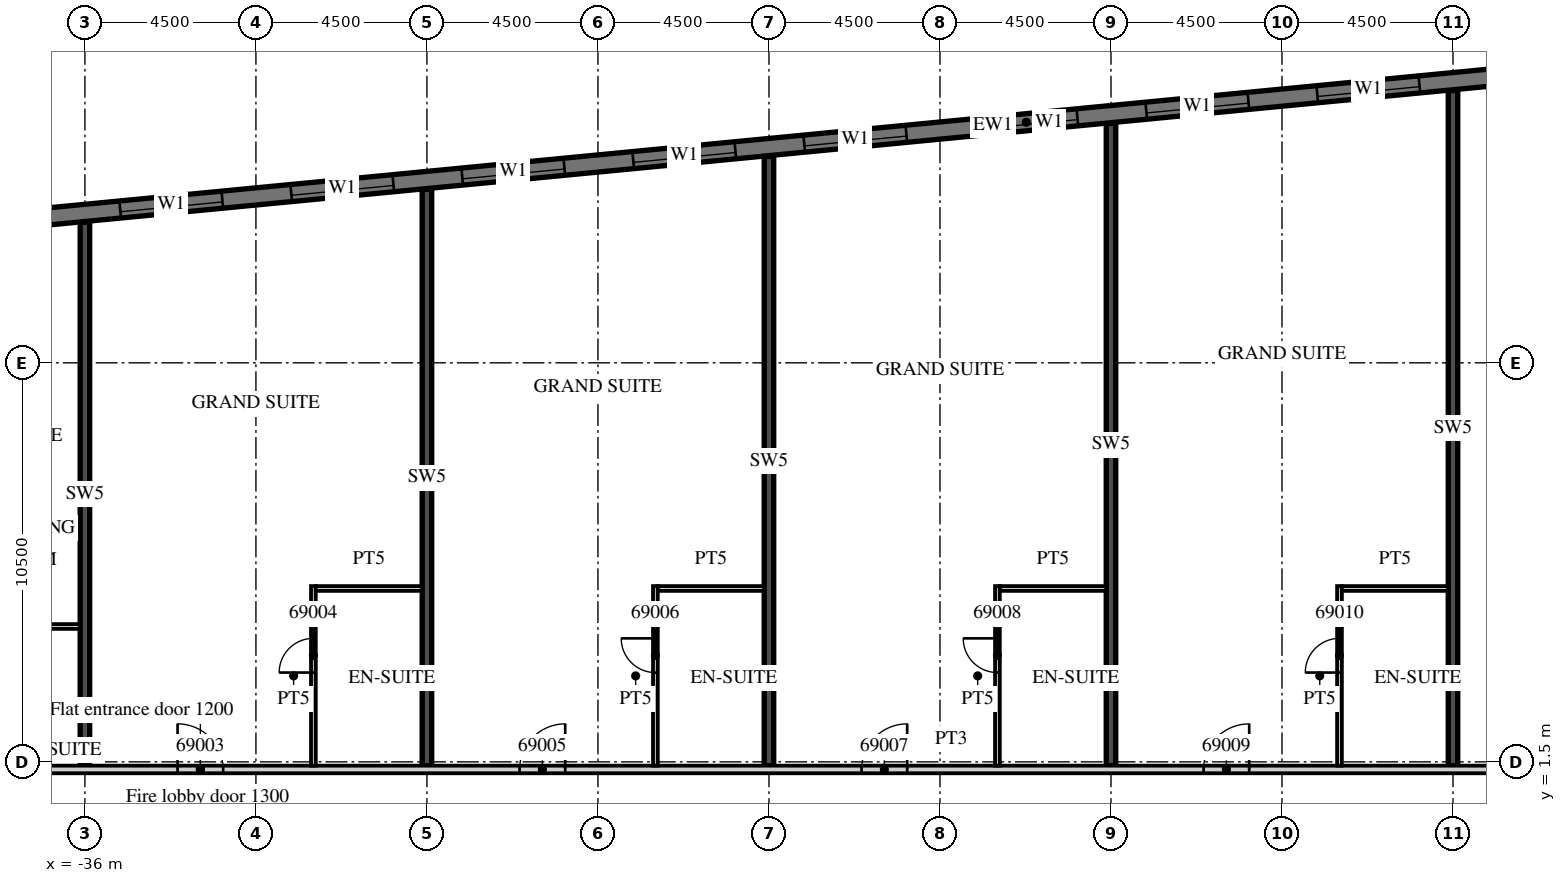
"""IFC4 building model, lengths in metres.
Left out: names, types, materials, properties, quantities, classifications, styles, units other than length and angle.
Written with IfcOpenShell. Run it as: python <this file> out.ifc"""

import sys

from ifc_helpers import new_model, si_unit, direction, frame, frame_2d, origin, place, context, subcontext, project, spatial, rectangle, extrude, element, fill, save


model = new_model("IFC4")
c1 = context("Model", 3, precision=1e-05, world=origin(), true_north=direction((0.0, 1.0)))
c2 = subcontext(c1, "Body", "Model", "MODEL_VIEW")
j1 = project(units=[si_unit("LENGTHUNIT", "METRE"), si_unit("PLANEANGLEUNIT", "RADIAN")], contexts=[c1])
p1 = place(None, origin())
s1 = spatial("IfcSite", under=j1, at=p1, CompositionType="ELEMENT")
p2 = place(p1, origin())
s2 = spatial("IfcBuilding", under=s1, at=p2, CompositionType="ELEMENT")
p3 = place(p2, frame((0.0, 0.0, 278.4)))
s3 = spatial("IfcBuildingStorey", under=s2, at=p3, CompositionType="ELEMENT", Elevation=278.4)
p4 = place(p3, frame((-36.0, 1.4, 0.0), z_axis=(0.0, 0.0, 1.0), x_axis=(0.0, 1.0, 0.0)))
e1 = element("IfcWall", 1, at=p4, inside=s3, PredefinedType="SHEAR", context=c2, shape_type="SweptSolid", body=[
    extrude(rectangle(XDim=14.296, YDim=0.25, at=frame_2d((7.148, 0.0))), origin(), (0.0, 0.0, 1.0), 3.3),
])
p5 = place(p3, frame((-27.0, 1.4, 0.0), z_axis=(0.0, 0.0, 1.0), x_axis=(0.0, 1.0, 0.0)))
e2 = element("IfcWall", 2, at=p5, inside=s3, PredefinedType="SHEAR", context=c2, shape_type="SweptSolid", body=[
    extrude(rectangle(XDim=15.163, YDim=0.25, at=frame_2d((7.582, 0.0))), origin(), (0.0, 0.0, 1.0), 3.3),
])
p6 = place(p3, frame((-18.0, 1.4, 0.0), z_axis=(0.0, 0.0, 1.0), x_axis=(0.0, 1.0, 0.0)))
e3 = element("IfcWall", 3, at=p6, inside=s3, PredefinedType="SHEAR", context=c2, shape_type="SweptSolid", body=[
    extrude(rectangle(XDim=16.03, YDim=0.25, at=frame_2d((8.015, 0.0))), origin(), (0.0, 0.0, 1.0), 3.3),
])
p7 = place(p3, frame((-9.0, 1.4, 0.0), z_axis=(0.0, 0.0, 1.0), x_axis=(0.0, 1.0, 0.0)))
e4 = element("IfcWall", 4, at=p7, inside=s3, PredefinedType="SHEAR", context=c2, shape_type="SweptSolid", body=[
    extrude(rectangle(XDim=16.896, YDim=0.25, at=frame_2d((8.448, 0.0))), origin(), (0.0, 0.0, 1.0), 3.3),
])
p8 = place(p3, frame((0.0, 1.4, 0.0), z_axis=(0.0, 0.0, 1.0), x_axis=(0.0, 1.0, 0.0)))
e5 = element("IfcWall", 5, at=p8, inside=s3, PredefinedType="SHEAR", context=c2, shape_type="SweptSolid", body=[
    extrude(rectangle(XDim=17.763, YDim=0.25, at=frame_2d((8.881, 0.0))), origin(), (0.0, 0.0, 1.0), 3.3),
])
p9 = place(p3, frame((13.521, 20.713, 0.0), z_axis=(0.0, 0.0, 1.0), x_axis=(-0.995396277313, -0.095844932638, 0.0)))
e6 = element("IfcWall", 6, at=p9, inside=s3, PredefinedType="SOLIDWALL", context=c2, shape_type="SweptSolid", body=[
    extrude(rectangle(XDim=51.495, YDim=0.45, at=frame_2d((25.748, 0.0))), origin(), (0.0, 0.0, 1.0), 3.02),
])
p10 = place(p9, frame((0.91, 0.0, 0.45)))
e7 = element("IfcOpeningElement", 7, at=p10, cuts=e6, PredefinedType="OPENING", context=c2, shape_type="SweptSolid", body=[
    extrude(rectangle(XDim=2.7, YDim=2.25, at=frame_2d((1.35, 1.125))), frame((0.0, 0.235, 0.0), z_axis=(0.0, -1.0, 0.0), x_axis=(1.0, 0.0, 0.0)), (0.0, 0.0, 1.0), 0.47),
])
p11 = place(p9, frame((5.431, 0.0, 0.45)))
e8 = element("IfcOpeningElement", 8, at=p11, cuts=e6, PredefinedType="OPENING", context=c2, shape_type="SweptSolid", body=[
    extrude(rectangle(XDim=2.7, YDim=2.25, at=frame_2d((1.35, 1.125))), frame((0.0, 0.235, 0.0), z_axis=(0.0, -1.0, 0.0), x_axis=(1.0, 0.0, 0.0)), (0.0, 0.0, 1.0), 0.47),
])
p12 = place(p9, frame((9.952, 0.0, 0.45)))
e9 = element("IfcOpeningElement", 9, at=p12, cuts=e6, PredefinedType="OPENING", context=c2, shape_type="SweptSolid", body=[
    extrude(rectangle(XDim=2.7, YDim=2.25, at=frame_2d((1.35, 1.125))), frame((0.0, 0.235, 0.0), z_axis=(0.0, -1.0, 0.0), x_axis=(1.0, 0.0, 0.0)), (0.0, 0.0, 1.0), 0.47),
])
p13 = place(p9, frame((14.473, 0.0, 0.45)))
e10 = element("IfcOpeningElement", 10, at=p13, cuts=e6, PredefinedType="OPENING", context=c2, shape_type="SweptSolid", body=[
    extrude(rectangle(XDim=2.7, YDim=2.25, at=frame_2d((1.35, 1.125))), frame((0.0, 0.235, 0.0), z_axis=(0.0, -1.0, 0.0), x_axis=(1.0, 0.0, 0.0)), (0.0, 0.0, 1.0), 0.47),
])
p14 = place(p9, frame((18.994, 0.0, 0.45)))
e11 = element("IfcOpeningElement", 11, at=p14, cuts=e6, PredefinedType="OPENING", context=c2, shape_type="SweptSolid", body=[
    extrude(rectangle(XDim=2.7, YDim=2.25, at=frame_2d((1.35, 1.125))), frame((0.0, 0.235, 0.0), z_axis=(0.0, -1.0, 0.0), x_axis=(1.0, 0.0, 0.0)), (0.0, 0.0, 1.0), 0.47),
])
p15 = place(p9, frame((23.514, 0.0, 0.45)))
e12 = element("IfcOpeningElement", 12, at=p15, cuts=e6, PredefinedType="OPENING", context=c2, shape_type="SweptSolid", body=[
    extrude(rectangle(XDim=2.7, YDim=2.25, at=frame_2d((1.35, 1.125))), frame((0.0, 0.235, 0.0), z_axis=(0.0, -1.0, 0.0), x_axis=(1.0, 0.0, 0.0)), (0.0, 0.0, 1.0), 0.47),
])
p16 = place(p9, frame((28.035, 0.0, 0.45)))
e13 = element("IfcOpeningElement", 13, at=p16, cuts=e6, PredefinedType="OPENING", context=c2, shape_type="SweptSolid", body=[
    extrude(rectangle(XDim=2.7, YDim=2.25, at=frame_2d((1.35, 1.125))), frame((0.0, 0.235, 0.0), z_axis=(0.0, -1.0, 0.0), x_axis=(1.0, 0.0, 0.0)), (0.0, 0.0, 1.0), 0.47),
])
p17 = place(p9, frame((32.556, 0.0, 0.45)))
e14 = element("IfcOpeningElement", 14, at=p17, cuts=e6, PredefinedType="OPENING", context=c2, shape_type="SweptSolid", body=[
    extrude(rectangle(XDim=2.7, YDim=2.25, at=frame_2d((1.35, 1.125))), frame((0.0, 0.235, 0.0), z_axis=(0.0, -1.0, 0.0), x_axis=(1.0, 0.0, 0.0)), (0.0, 0.0, 1.0), 0.47),
])
p18 = place(p9, frame((37.077, 0.0, 0.45)))
e15 = element("IfcOpeningElement", 15, at=p18, cuts=e6, PredefinedType="OPENING", context=c2, shape_type="SweptSolid", body=[
    extrude(rectangle(XDim=2.7, YDim=2.25, at=frame_2d((1.35, 1.125))), frame((0.0, 0.235, 0.0), z_axis=(0.0, -1.0, 0.0), x_axis=(1.0, 0.0, 0.0)), (0.0, 0.0, 1.0), 0.47),
])
p19 = place(p9, frame((41.598, 0.0, 0.45)))
e16 = element("IfcOpeningElement", 16, at=p19, cuts=e6, PredefinedType="OPENING", context=c2, shape_type="SweptSolid", body=[
    extrude(rectangle(XDim=2.7, YDim=2.25, at=frame_2d((1.35, 1.125))), frame((0.0, 0.235, 0.0), z_axis=(0.0, -1.0, 0.0), x_axis=(1.0, 0.0, 0.0)), (0.0, 0.0, 1.0), 0.47),
])
p20 = place(p9, frame((46.118, 0.0, 0.45)))
e17 = element("IfcOpeningElement", 17, at=p20, cuts=e6, PredefinedType="OPENING", context=c2, shape_type="SweptSolid", body=[
    extrude(rectangle(XDim=2.7, YDim=2.25, at=frame_2d((1.35, 1.125))), frame((0.0, 0.235, 0.0), z_axis=(0.0, -1.0, 0.0), x_axis=(1.0, 0.0, 0.0)), (0.0, 0.0, 1.0), 0.47),
])
p21 = place(p3, frame((-39.909, 1.3, 0.0), z_axis=(0.0, 0.0, 1.0), x_axis=(1.0, 0.0, 0.0)))
e18 = element("IfcWall", 18, at=p21, inside=s3, PredefinedType="PARTITIONING", context=c2, shape_type="SweptSolid", body=[
    extrude(rectangle(XDim=53.409, YDim=0.2, at=frame_2d((26.705, 0.0))), origin(), (0.0, 0.0, 1.0), 3.02),
])
p22 = place(p21, frame((0.15, 0.0, 0.0)))
e19 = element("IfcOpeningElement", 19, at=p22, cuts=e18, PredefinedType="OPENING", context=c2, shape_type="SweptSolid", body=[
    extrude(rectangle(XDim=0.9, YDim=2.1, at=frame_2d((0.45, 1.05))), frame((0.0, 0.11, 0.0), z_axis=(0.0, -1.0, 0.0), x_axis=(1.0, 0.0, 0.0)), (0.0, 0.0, 1.0), 0.22),
])
p23 = place(p21, frame((6.347, 0.0, 0.0)))
e20 = element("IfcOpeningElement", 20, at=p23, cuts=e18, PredefinedType="OPENING", context=c2, shape_type="SweptSolid", body=[
    extrude(rectangle(XDim=1.2, YDim=2.1, at=frame_2d((0.6, 1.05))), frame((0.0, 0.11, 0.0), z_axis=(0.0, -1.0, 0.0), x_axis=(1.0, 0.0, 0.0)), (0.0, 0.0, 1.0), 0.22),
])
p24 = place(p21, frame((15.347, 0.0, 0.0)))
e21 = element("IfcOpeningElement", 21, at=p24, cuts=e18, PredefinedType="OPENING", context=c2, shape_type="SweptSolid", body=[
    extrude(rectangle(XDim=1.2, YDim=2.1, at=frame_2d((0.6, 1.05))), frame((0.0, 0.11, 0.0), z_axis=(0.0, -1.0, 0.0), x_axis=(1.0, 0.0, 0.0)), (0.0, 0.0, 1.0), 0.22),
])
p25 = place(p21, frame((24.346, 0.0, 0.0)))
e22 = element("IfcOpeningElement", 22, at=p25, cuts=e18, PredefinedType="OPENING", context=c2, shape_type="SweptSolid", body=[
    extrude(rectangle(XDim=1.2, YDim=2.1, at=frame_2d((0.6, 1.05))), frame((0.0, 0.11, 0.0), z_axis=(0.0, -1.0, 0.0), x_axis=(1.0, 0.0, 0.0)), (0.0, 0.0, 1.0), 0.22),
])
p26 = place(p21, frame((33.346, 0.0, 0.0)))
e23 = element("IfcOpeningElement", 23, at=p26, cuts=e18, PredefinedType="OPENING", context=c2, shape_type="SweptSolid", body=[
    extrude(rectangle(XDim=1.2, YDim=2.1, at=frame_2d((0.6, 1.05))), frame((0.0, 0.11, 0.0), z_axis=(0.0, -1.0, 0.0), x_axis=(1.0, 0.0, 0.0)), (0.0, 0.0, 1.0), 0.22),
])
p27 = place(p21, frame((42.346, 0.0, 0.0)))
e24 = element("IfcOpeningElement", 24, at=p27, cuts=e18, PredefinedType="OPENING", context=c2, shape_type="SweptSolid", body=[
    extrude(rectangle(XDim=1.2, YDim=2.1, at=frame_2d((0.6, 1.05))), frame((0.0, 0.11, 0.0), z_axis=(0.0, -1.0, 0.0), x_axis=(1.0, 0.0, 0.0)), (0.0, 0.0, 1.0), 0.22),
])
p28 = place(p21, frame((51.834, 0.0, 0.0)))
e25 = element("IfcOpeningElement", 25, at=p28, cuts=e18, PredefinedType="OPENING", context=c2, shape_type="SweptSolid", body=[
    extrude(rectangle(XDim=1.0, YDim=2.1, at=frame_2d((0.5, 1.05))), frame((0.0, 0.11, 0.0), z_axis=(0.0, -1.0, 0.0), x_axis=(1.0, 0.0, 0.0)), (0.0, 0.0, 1.0), 0.22),
])
p29 = place(p3, frame((-38.878, 5.062, 0.0), z_axis=(0.0, 0.0, 1.0), x_axis=(1.0, 0.0, 0.0)))
e26 = element("IfcWall", 26, at=p29, inside=s3, PredefinedType="PARTITIONING", context=c2, shape_type="SweptSolid", body=[
    extrude(rectangle(XDim=2.753, YDim=0.125, at=frame_2d((1.376, 0.0))), origin(), (0.0, 0.0, 1.0), 3.02),
])
p30 = place(p3, frame((-29.988, 1.4, 0.0), z_axis=(0.0, 0.0, 1.0), x_axis=(0.0, 1.0, 0.0)))
e27 = element("IfcWall", 27, at=p30, inside=s3, PredefinedType="PARTITIONING", context=c2, shape_type="SweptSolid", body=[
    extrude(rectangle(XDim=4.725, YDim=0.125, at=frame_2d((2.363, 0.0))), origin(), (0.0, 0.0, 1.0), 3.02),
])
p31 = place(p30, frame((2.45, 0.0, 0.0)))
e28 = element("IfcOpeningElement", 28, at=p31, cuts=e27, PredefinedType="OPENING", context=c2, shape_type="SweptSolid", body=[
    extrude(rectangle(XDim=0.9, YDim=2.1, at=frame_2d((0.45, 1.05))), frame((0.0, 0.073, 0.0), z_axis=(0.0, -1.0, 0.0), x_axis=(1.0, 0.0, 0.0)), (0.0, 0.0, 1.0), 0.145),
])
p32 = place(p3, frame((-29.925, 6.062, 0.0), z_axis=(0.0, 0.0, 1.0), x_axis=(1.0, 0.0, 0.0)))
e29 = element("IfcWall", 29, at=p32, inside=s3, PredefinedType="PARTITIONING", context=c2, shape_type="SweptSolid", body=[
    extrude(rectangle(XDim=2.8, YDim=0.125, at=frame_2d((1.4, 0.0))), origin(), (0.0, 0.0, 1.0), 3.02),
])
p33 = place(p3, frame((-20.988, 1.4, 0.0), z_axis=(0.0, 0.0, 1.0), x_axis=(0.0, 1.0, 0.0)))
e30 = element("IfcWall", 30, at=p33, inside=s3, PredefinedType="PARTITIONING", context=c2, shape_type="SweptSolid", body=[
    extrude(rectangle(XDim=4.725, YDim=0.125, at=frame_2d((2.363, 0.0))), origin(), (0.0, 0.0, 1.0), 3.02),
])
p34 = place(p33, frame((2.45, 0.0, 0.0)))
e31 = element("IfcOpeningElement", 31, at=p34, cuts=e30, PredefinedType="OPENING", context=c2, shape_type="SweptSolid", body=[
    extrude(rectangle(XDim=0.9, YDim=2.1, at=frame_2d((0.45, 1.05))), frame((0.0, 0.073, 0.0), z_axis=(0.0, -1.0, 0.0), x_axis=(1.0, 0.0, 0.0)), (0.0, 0.0, 1.0), 0.145),
])
p35 = place(p3, frame((-20.925, 6.062, 0.0), z_axis=(0.0, 0.0, 1.0), x_axis=(1.0, 0.0, 0.0)))
e32 = element("IfcWall", 32, at=p35, inside=s3, PredefinedType="PARTITIONING", context=c2, shape_type="SweptSolid", body=[
    extrude(rectangle(XDim=2.8, YDim=0.125, at=frame_2d((1.4, 0.0))), origin(), (0.0, 0.0, 1.0), 3.02),
])
p36 = place(p3, frame((-11.988, 1.4, 0.0), z_axis=(0.0, 0.0, 1.0), x_axis=(0.0, 1.0, 0.0)))
e33 = element("IfcWall", 33, at=p36, inside=s3, PredefinedType="PARTITIONING", context=c2, shape_type="SweptSolid", body=[
    extrude(rectangle(XDim=4.725, YDim=0.125, at=frame_2d((2.363, 0.0))), origin(), (0.0, 0.0, 1.0), 3.02),
])
p37 = place(p36, frame((2.45, 0.0, 0.0)))
e34 = element("IfcOpeningElement", 34, at=p37, cuts=e33, PredefinedType="OPENING", context=c2, shape_type="SweptSolid", body=[
    extrude(rectangle(XDim=0.9, YDim=2.1, at=frame_2d((0.45, 1.05))), frame((0.0, 0.073, 0.0), z_axis=(0.0, -1.0, 0.0), x_axis=(1.0, 0.0, 0.0)), (0.0, 0.0, 1.0), 0.145),
])
p38 = place(p3, frame((-11.925, 6.062, 0.0), z_axis=(0.0, 0.0, 1.0), x_axis=(1.0, 0.0, 0.0)))
e35 = element("IfcWall", 35, at=p38, inside=s3, PredefinedType="PARTITIONING", context=c2, shape_type="SweptSolid", body=[
    extrude(rectangle(XDim=2.8, YDim=0.125, at=frame_2d((1.4, 0.0))), origin(), (0.0, 0.0, 1.0), 3.02),
])
p39 = place(p3, frame((-2.987, 1.4, 0.0), z_axis=(0.0, 0.0, 1.0), x_axis=(0.0, 1.0, 0.0)))
e36 = element("IfcWall", 36, at=p39, inside=s3, PredefinedType="PARTITIONING", context=c2, shape_type="SweptSolid", body=[
    extrude(rectangle(XDim=4.725, YDim=0.125, at=frame_2d((2.363, 0.0))), origin(), (0.0, 0.0, 1.0), 3.02),
])
p40 = place(p39, frame((2.45, 0.0, 0.0)))
e37 = element("IfcOpeningElement", 37, at=p40, cuts=e36, PredefinedType="OPENING", context=c2, shape_type="SweptSolid", body=[
    extrude(rectangle(XDim=0.9, YDim=2.1, at=frame_2d((0.45, 1.05))), frame((0.0, 0.073, 0.0), z_axis=(0.0, -1.0, 0.0), x_axis=(1.0, 0.0, 0.0)), (0.0, 0.0, 1.0), 0.145),
])
p41 = place(p3, frame((-2.925, 6.062, 0.0), z_axis=(0.0, 0.0, 1.0), x_axis=(1.0, 0.0, 0.0)))
e38 = element("IfcWall", 38, at=p41, inside=s3, PredefinedType="PARTITIONING", context=c2, shape_type="SweptSolid", body=[
    extrude(rectangle(XDim=2.8, YDim=0.125, at=frame_2d((1.4, 0.0))), origin(), (0.0, 0.0, 1.0), 3.02),
])
p42 = place(p13, origin())
e39 = element("IfcWindow", 39, at=p42, inside=s3, PartitioningType="SINGLE_PANEL", PredefinedType="WINDOW", context=c2, shape_type="SweptSolid", body=[
    extrude(rectangle(XDim=2.7, YDim=2.25, at=frame_2d((1.35, 1.125))), frame((0.0, 0.09, 0.0), z_axis=(0.0, -1.0, 0.0), x_axis=(1.0, 0.0, 0.0)), (0.0, 0.0, 1.0), 0.06),
])
fill(e10, e39)
p43 = place(p14, origin())
e40 = element("IfcWindow", 40, at=p43, inside=s3, PartitioningType="SINGLE_PANEL", PredefinedType="WINDOW", context=c2, shape_type="SweptSolid", body=[
    extrude(rectangle(XDim=2.7, YDim=2.25, at=frame_2d((1.35, 1.125))), frame((0.0, 0.09, 0.0), z_axis=(0.0, -1.0, 0.0), x_axis=(1.0, 0.0, 0.0)), (0.0, 0.0, 1.0), 0.06),
])
fill(e11, e40)
p44 = place(p15, origin())
e41 = element("IfcWindow", 41, at=p44, inside=s3, PartitioningType="SINGLE_PANEL", PredefinedType="WINDOW", context=c2, shape_type="SweptSolid", body=[
    extrude(rectangle(XDim=2.7, YDim=2.25, at=frame_2d((1.35, 1.125))), frame((0.0, 0.09, 0.0), z_axis=(0.0, -1.0, 0.0), x_axis=(1.0, 0.0, 0.0)), (0.0, 0.0, 1.0), 0.06),
])
fill(e12, e41)
p45 = place(p16, origin())
e42 = element("IfcWindow", 42, at=p45, inside=s3, PartitioningType="SINGLE_PANEL", PredefinedType="WINDOW", context=c2, shape_type="SweptSolid", body=[
    extrude(rectangle(XDim=2.7, YDim=2.25, at=frame_2d((1.35, 1.125))), frame((0.0, 0.09, 0.0), z_axis=(0.0, -1.0, 0.0), x_axis=(1.0, 0.0, 0.0)), (0.0, 0.0, 1.0), 0.06),
])
fill(e13, e42)
p46 = place(p17, origin())
e43 = element("IfcWindow", 43, at=p46, inside=s3, PartitioningType="SINGLE_PANEL", PredefinedType="WINDOW", context=c2, shape_type="SweptSolid", body=[
    extrude(rectangle(XDim=2.7, YDim=2.25, at=frame_2d((1.35, 1.125))), frame((0.0, 0.09, 0.0), z_axis=(0.0, -1.0, 0.0), x_axis=(1.0, 0.0, 0.0)), (0.0, 0.0, 1.0), 0.06),
])
fill(e14, e43)
p47 = place(p18, origin())
e44 = element("IfcWindow", 44, at=p47, inside=s3, PartitioningType="SINGLE_PANEL", PredefinedType="WINDOW", context=c2, shape_type="SweptSolid", body=[
    extrude(rectangle(XDim=2.7, YDim=2.25, at=frame_2d((1.35, 1.125))), frame((0.0, 0.09, 0.0), z_axis=(0.0, -1.0, 0.0), x_axis=(1.0, 0.0, 0.0)), (0.0, 0.0, 1.0), 0.06),
])
fill(e15, e44)
p48 = place(p19, origin())
e45 = element("IfcWindow", 45, at=p48, inside=s3, PartitioningType="SINGLE_PANEL", PredefinedType="WINDOW", context=c2, shape_type="SweptSolid", body=[
    extrude(rectangle(XDim=2.7, YDim=2.25, at=frame_2d((1.35, 1.125))), frame((0.0, 0.09, 0.0), z_axis=(0.0, -1.0, 0.0), x_axis=(1.0, 0.0, 0.0)), (0.0, 0.0, 1.0), 0.06),
])
fill(e16, e45)
p49 = place(p20, origin())
e46 = element("IfcWindow", 46, at=p49, inside=s3, PartitioningType="SINGLE_PANEL", PredefinedType="WINDOW", context=c2, shape_type="SweptSolid", body=[
    extrude(rectangle(XDim=2.7, YDim=2.25, at=frame_2d((1.35, 1.125))), frame((0.0, 0.09, 0.0), z_axis=(0.0, -1.0, 0.0), x_axis=(1.0, 0.0, 0.0)), (0.0, 0.0, 1.0), 0.06),
])
fill(e17, e46)
p50 = place(p23, origin())
e47 = element("IfcDoor", 47, at=p50, inside=s3, OperationType="SINGLE_SWING_LEFT", PredefinedType="DOOR", context=c2, shape_type="SweptSolid", body=[
    extrude(rectangle(XDim=1.2, YDim=2.1, at=frame_2d((0.6, 1.05))), frame((0.0, 0.025, 0.0), z_axis=(0.0, -1.0, 0.0), x_axis=(1.0, 0.0, 0.0)), (0.0, 0.0, 1.0), 0.05),
])
fill(e20, e47)
p51 = place(p31, origin())
e48 = element("IfcDoor", 48, at=p51, inside=s3, OperationType="SINGLE_SWING_LEFT", PredefinedType="DOOR", context=c2, shape_type="SweptSolid", body=[
    extrude(rectangle(XDim=0.9, YDim=2.1, at=frame_2d((0.45, 1.05))), frame((0.0, 0.025, 0.0), z_axis=(0.0, -1.0, 0.0), x_axis=(1.0, 0.0, 0.0)), (0.0, 0.0, 1.0), 0.05),
])
fill(e28, e48)
p52 = place(p24, origin())
e49 = element("IfcDoor", 49, at=p52, inside=s3, OperationType="SINGLE_SWING_RIGHT", PredefinedType="DOOR", context=c2, shape_type="SweptSolid", body=[
    extrude(rectangle(XDim=1.2, YDim=2.1, at=frame_2d((0.6, 1.05))), frame((0.0, 0.025, 0.0), z_axis=(0.0, -1.0, 0.0), x_axis=(1.0, 0.0, 0.0)), (0.0, 0.0, 1.0), 0.05),
])
fill(e21, e49)
p53 = place(p34, origin())
e50 = element("IfcDoor", 50, at=p53, inside=s3, OperationType="SINGLE_SWING_RIGHT", PredefinedType="DOOR", context=c2, shape_type="SweptSolid", body=[
    extrude(rectangle(XDim=0.9, YDim=2.1, at=frame_2d((0.45, 1.05))), frame((0.0, 0.025, 0.0), z_axis=(0.0, -1.0, 0.0), x_axis=(1.0, 0.0, 0.0)), (0.0, 0.0, 1.0), 0.05),
])
fill(e31, e50)
p54 = place(p25, origin())
e51 = element("IfcDoor", 51, at=p54, inside=s3, OperationType="SINGLE_SWING_RIGHT", PredefinedType="DOOR", context=c2, shape_type="SweptSolid", body=[
    extrude(rectangle(XDim=1.2, YDim=2.1, at=frame_2d((0.6, 1.05))), frame((0.0, 0.025, 0.0), z_axis=(0.0, -1.0, 0.0), x_axis=(1.0, 0.0, 0.0)), (0.0, 0.0, 1.0), 0.05),
])
fill(e22, e51)
p55 = place(p37, origin())
e52 = element("IfcDoor", 52, at=p55, inside=s3, OperationType="SINGLE_SWING_RIGHT", PredefinedType="DOOR", context=c2, shape_type="SweptSolid", body=[
    extrude(rectangle(XDim=0.9, YDim=2.1, at=frame_2d((0.45, 1.05))), frame((0.0, 0.025, 0.0), z_axis=(0.0, -1.0, 0.0), x_axis=(1.0, 0.0, 0.0)), (0.0, 0.0, 1.0), 0.05),
])
fill(e34, e52)
p56 = place(p26, origin())
e53 = element("IfcDoor", 53, at=p56, inside=s3, OperationType="SINGLE_SWING_RIGHT", PredefinedType="DOOR", context=c2, shape_type="SweptSolid", body=[
    extrude(rectangle(XDim=1.2, YDim=2.1, at=frame_2d((0.6, 1.05))), frame((0.0, 0.025, 0.0), z_axis=(0.0, -1.0, 0.0), x_axis=(1.0, 0.0, 0.0)), (0.0, 0.0, 1.0), 0.05),
])
fill(e23, e53)
p57 = place(p40, origin())
e54 = element("IfcDoor", 54, at=p57, inside=s3, OperationType="SINGLE_SWING_LEFT", PredefinedType="DOOR", context=c2, shape_type="SweptSolid", body=[
    extrude(rectangle(XDim=0.9, YDim=2.1, at=frame_2d((0.45, 1.05))), frame((0.0, 0.025, 0.0), z_axis=(0.0, -1.0, 0.0), x_axis=(1.0, 0.0, 0.0)), (0.0, 0.0, 1.0), 0.05),
])
fill(e37, e54)
save(model, sys.argv[1])
